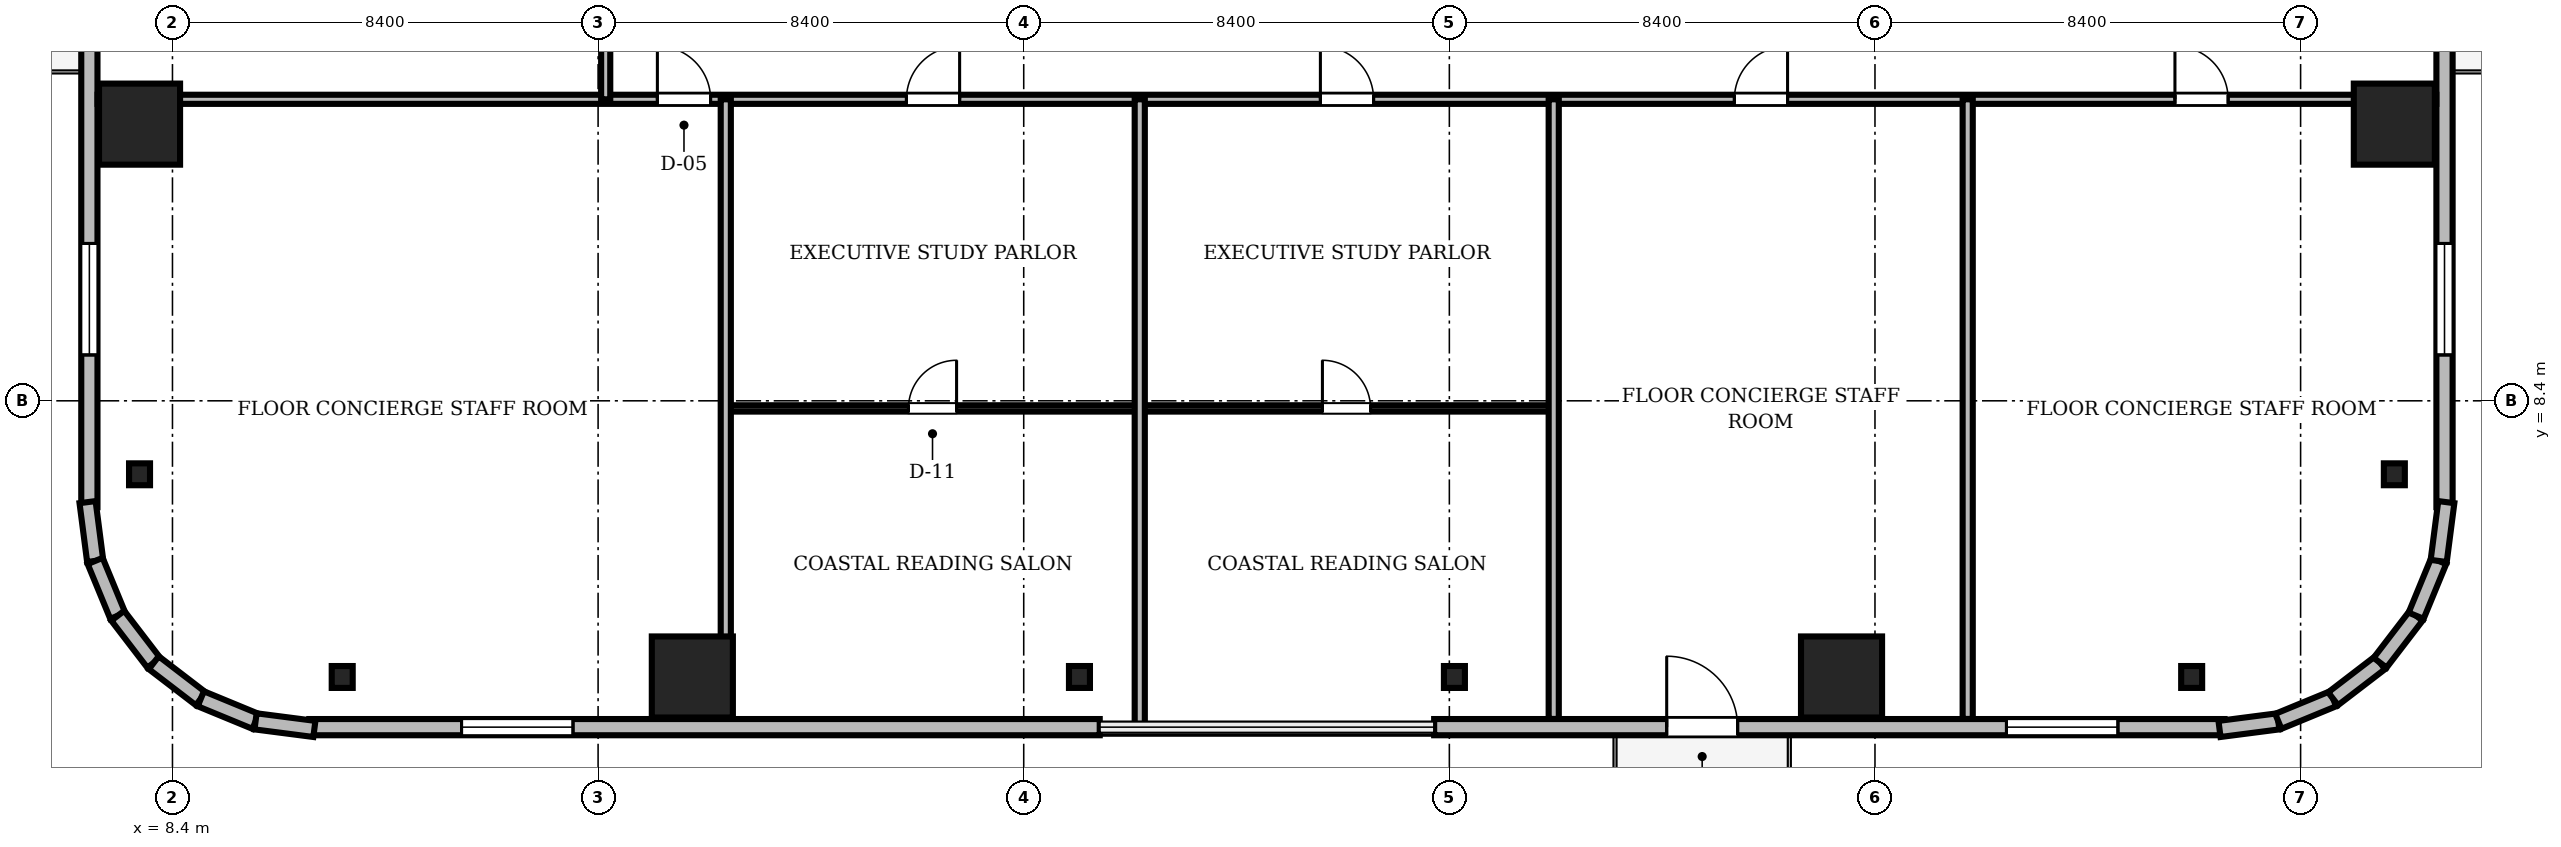
"""IFC4 building model, lengths in metres.
Left out: names, types, materials, properties, quantities, classifications, styles, units other than length and angle.
Written with IfcOpenShell. Run it as: python <this file> out.ifc"""

import sys

from ifc_helpers import new_model, si_unit, direction, frame, frame_2d, origin, origin_2d, place, context, subcontext, project, spatial, rectangle, i_section, extrude, source, transform, mapped, element, fill, save


model = new_model("IFC4")
c1 = context("Model", 3, precision=1e-05, world=origin(), true_north=direction((0.0, 1.0)))
c2 = subcontext(c1, "Body", "Model", "MODEL_VIEW")
j1 = project(units=[si_unit("LENGTHUNIT", "METRE"), si_unit("PLANEANGLEUNIT", "RADIAN")], contexts=[c1])
p1 = place(None, origin())
s1 = spatial("IfcSite", under=j1, at=p1, CompositionType="ELEMENT")
p2 = place(p1, origin())
s2 = spatial("IfcBuilding", under=s1, at=p2, CompositionType="ELEMENT")
p3 = place(p2, frame((0.0, 0.0, 159.4)))
s3 = spatial("IfcBuildingStorey", under=s2, at=p3, CompositionType="ELEMENT", Elevation=159.4)
m1 = source(origin(), c2, "Body", "SweptSolid", [
    extrude(rectangle(XDim=1.6, YDim=1.6, at=origin_2d()), origin(), (0.0, 0.0, 1.0), 3.46),
])
for number, where, z_axis, x_axis in (
    (1, (18.66, 2.95, 0.0), (0.0, 0.0, 1.0), (1.0, 0.0, 0.0)),
    (2, (41.34, 2.95, 0.0), (0.0, 0.0, 1.0), (1.0, 0.0, 0.0)),
    (3, (52.25, 13.86, 0.0), (0.0, 0.0, 1.0), (1.0, 0.0, 0.0)),
    (4, (7.75, 13.86, 0.0), (0.0, 0.0, 1.0), (1.0, 0.0, 0.0)),
):
    element("IfcColumn", number, at=place(p3, frame(where, z_axis=z_axis, x_axis=x_axis)), inside=s3, PredefinedType="COLUMN", context=c2, shape_type="MappedRepresentation", body=[
        mapped(m1, transform((0.0, 0.0, 0.0), scale=1.0)),
    ])
m2 = source(origin(), c2, "Body", "SweptSolid", [
    extrude(i_section(OverallWidth=0.414, OverallDepth=0.432, WebThickness=0.026, FlangeThickness=0.04, FilletRadius=0.015, at=origin_2d()), origin(), (0.0, 0.0, 1.0), 3.46),
])
for number, where, z_axis, x_axis in (
    (5, (11.75, 2.95, 0.0), (0.0, 0.0, 1.0), (1.0, 0.0, 0.0)),
    (6, (26.3, 2.95, 0.0), (0.0, 0.0, 1.0), (1.0, 0.0, 0.0)),
    (7, (33.7, 2.95, 0.0), (0.0, 0.0, 1.0), (1.0, 0.0, 0.0)),
    (8, (48.25, 2.95, 0.0), (0.0, 0.0, 1.0), (1.0, 0.0, 0.0)),
    (9, (52.25, 6.95, 0.0), (0.0, 0.0, 1.0), (1.0, 0.0, 0.0)),
    (10, (7.75, 6.95, 0.0), (0.0, 0.0, 1.0), (1.0, 0.0, 0.0)),
):
    element("IfcColumn", number, at=place(p3, frame(where, z_axis=z_axis, x_axis=x_axis)), inside=s3, PredefinedType="COLUMN", context=c2, shape_type="MappedRepresentation", body=[
        mapped(m2, transform((0.0, 0.0, 0.0), scale=1.0)),
    ])
m3 = source(origin(), c2, "Body", "SweptSolid", [
    extrude(rectangle(XDim=15.6, YDim=0.32, at=frame_2d((7.8, 0.0))), origin(), (0.0, 0.0, 1.0), 3.46),
])
p4 = place(p3, frame((11.1, 1.96, 0.0), z_axis=(0.0, 0.0, 1.0), x_axis=(1.0, 0.0, 0.0)))
e11 = element("IfcWall", 11, at=p4, inside=s3, PredefinedType="SOLIDWALL", context=c2, shape_type="MappedRepresentation", body=[
    mapped(m3, transform((0.0, 0.0, 0.0), scale=1.0)),
])
m4 = source(origin(), c2, "Body", "SweptSolid", [
    extrude(rectangle(XDim=2.2, YDim=2.4, at=frame_2d((1.1, 1.2))), frame((0.0, 0.17, 0.0), z_axis=(0.0, -1.0, 0.0), x_axis=(1.0, 0.0, 0.0)), (0.0, 0.0, 1.0), 0.34),
])
p5 = place(p4, frame((3.005, 0.0, 0.72)))
e12 = element("IfcOpeningElement", 12, at=p5, cuts=e11, PredefinedType="OPENING", context=c2, shape_type="MappedRepresentation", body=[
    mapped(m4, transform((0.0, 0.0, 0.0), scale=1.0)),
])
p6 = place(p3, frame((33.3, 1.96, 0.0), z_axis=(0.0, 0.0, 1.0), x_axis=(1.0, 0.0, 0.0)))
e13 = element("IfcWall", 13, at=p6, inside=s3, PredefinedType="SOLIDWALL", context=c2, shape_type="MappedRepresentation", body=[
    mapped(m3, transform((0.0, 0.0, 0.0), scale=1.0)),
])
m5 = source(origin(), c2, "Body", "SweptSolid", [
    extrude(rectangle(XDim=1.4, YDim=2.3, at=frame_2d((0.7, 1.15))), frame((0.0, 0.17, 0.0), z_axis=(0.0, -1.0, 0.0), x_axis=(1.0, 0.0, 0.0)), (0.0, 0.0, 1.0), 0.34),
])
p7 = place(p6, frame((4.59, 0.0, 0.0)))
e14 = element("IfcOpeningElement", 14, at=p7, cuts=e13, PredefinedType="OPENING", context=c2, shape_type="MappedRepresentation", body=[
    mapped(m5, transform((0.0, 0.0, 0.0), scale=1.0)),
])
p8 = place(p6, frame((11.295, 0.0, 0.72)))
e15 = element("IfcOpeningElement", 15, at=p8, cuts=e13, PredefinedType="OPENING", context=c2, shape_type="MappedRepresentation", body=[
    mapped(m4, transform((0.0, 0.0, 0.0), scale=1.0)),
])
p9 = place(p3, frame((6.76, 21.9, 0.0), z_axis=(0.0, 0.0, 1.0), x_axis=(0.0, -1.0, 0.0)))
e16 = element("IfcWall", 16, at=p9, inside=s3, PredefinedType="SOLIDWALL", context=c2, shape_type="MappedRepresentation", body=[
    mapped(m3, transform((0.0, 0.0, 0.0), scale=1.0)),
])
p10 = place(p9, frame((4.59, 0.0, 0.0)))
e17 = element("IfcOpeningElement", 17, at=p10, cuts=e16, PredefinedType="OPENING", context=c2, shape_type="MappedRepresentation", body=[
    mapped(m5, transform((0.0, 0.0, 0.0), scale=1.0)),
])
p11 = place(p9, frame((10.395, 0.0, 0.72)))
e18 = element("IfcOpeningElement", 18, at=p11, cuts=e16, PredefinedType="OPENING", context=c2, shape_type="MappedRepresentation", body=[
    mapped(m4, transform((0.0, 0.0, 0.0), scale=1.0)),
])
p12 = place(p3, frame((53.24, 6.3, 0.0), z_axis=(0.0, 0.0, 1.0), x_axis=(0.0, 1.0, 0.0)))
e19 = element("IfcWall", 19, at=p12, inside=s3, PredefinedType="SOLIDWALL", context=c2, shape_type="MappedRepresentation", body=[
    mapped(m3, transform((0.0, 0.0, 0.0), scale=1.0)),
])
p13 = place(p12, frame((9.61, 0.0, 0.0)))
e20 = element("IfcOpeningElement", 20, at=p13, cuts=e19, PredefinedType="OPENING", context=c2, shape_type="MappedRepresentation", body=[
    mapped(m5, transform((0.0, 0.0, 0.0), scale=1.0)),
])
p14 = place(p12, frame((3.005, 0.0, 0.72)))
e21 = element("IfcOpeningElement", 21, at=p14, cuts=e19, PredefinedType="OPENING", context=c2, shape_type="MappedRepresentation", body=[
    mapped(m4, transform((0.0, 0.0, 0.0), scale=1.0)),
])
m6 = source(origin(), c2, "Body", "SweptSolid", [
    extrude(rectangle(XDim=1.171, YDim=0.32, at=frame_2d((0.585, 0.0))), origin(), (0.0, 0.0, 1.0), 3.46),
])
p15 = place(p3, frame((6.724, 6.401, 0.0), z_axis=(0.0, 0.0, 1.0), x_axis=(0.128269133229, -0.991739395941, 0.0)))
e22 = element("IfcWall", 22, at=p15, inside=s3, PredefinedType="SOLIDWALL", context=c2, shape_type="MappedRepresentation", body=[
    mapped(m6, transform((0.0, 0.0, 0.0), scale=1.0)),
])
m7 = source(origin(), c2, "Body", "SweptSolid", [
    extrude(rectangle(XDim=1.169, YDim=0.32, at=frame_2d((0.584, 0.0))), origin(), (0.0, 0.0, 1.0), 3.46),
])
for number, where, z_axis, x_axis in (
    (23, (6.875, 5.24, 0.0), (0.0, 0.0, 1.0), (0.381, -0.925, 0.0)),
    (24, (7.32, 4.159, 0.0), (0.0, 0.0, 1.0), (0.608, -0.794, 0.0)),
):
    element("IfcWall", number, at=place(p3, frame(where, z_axis=z_axis, x_axis=x_axis)), inside=s3, PredefinedType="SOLIDWALL", context=c2, shape_type="MappedRepresentation", body=[
        mapped(m7, transform((0.0, 0.0, 0.0), scale=1.0)),
    ])
m8 = source(origin(), c2, "Body", "SweptSolid", [
    extrude(rectangle(XDim=1.169, YDim=0.32, at=frame_2d((0.584, 0.0))), origin(), (0.0, 0.0, 1.0), 3.46),
])
p16 = place(p3, frame((8.031, 3.231, 0.0), z_axis=(0.0, 0.0, 1.0), x_axis=(0.793663520347, -0.608356981114, 0.0)))
e25 = element("IfcWall", 25, at=p16, inside=s3, PredefinedType="SOLIDWALL", context=c2, shape_type="MappedRepresentation", body=[
    mapped(m8, transform((0.0, 0.0, 0.0), scale=1.0)),
])
m9 = source(origin(), c2, "Body", "SweptSolid", [
    extrude(rectangle(XDim=1.169, YDim=0.32, at=frame_2d((0.585, 0.0))), origin(), (0.0, 0.0, 1.0), 3.46),
])
p17 = place(p3, frame((8.959, 2.52, 0.0), z_axis=(0.0, 0.0, 1.0), x_axis=(0.924479075121, -0.381232789334, 0.0)))
e26 = element("IfcWall", 26, at=p17, inside=s3, PredefinedType="SOLIDWALL", context=c2, shape_type="MappedRepresentation", body=[
    mapped(m9, transform((0.0, 0.0, 0.0), scale=1.0)),
])
m10 = source(origin(), c2, "Body", "SweptSolid", [
    extrude(rectangle(XDim=1.17, YDim=0.32, at=frame_2d((0.585, 0.0))), origin(), (0.0, 0.0, 1.0), 3.46),
])
for number, where, z_axis, x_axis in (
    (27, (10.04, 2.074, 0.0), (0.0, 0.0, 1.0), (0.992, -0.128, 0.0)),
    (28, (48.8, 1.925, 0.0), (0.0, 0.0, 1.0), (0.992, 0.128, 0.0)),
):
    element("IfcWall", number, at=place(p3, frame(where, z_axis=z_axis, x_axis=x_axis)), inside=s3, PredefinedType="SOLIDWALL", context=c2, shape_type="MappedRepresentation", body=[
        mapped(m10, transform((0.0, 0.0, 0.0), scale=1.0)),
    ])
p18 = place(p3, frame((49.96, 2.074, 0.0), z_axis=(0.0, 0.0, 1.0), x_axis=(0.924479075121, 0.381232789334, 0.0)))
e29 = element("IfcWall", 29, at=p18, inside=s3, PredefinedType="SOLIDWALL", context=c2, shape_type="MappedRepresentation", body=[
    mapped(m9, transform((0.0, 0.0, 0.0), scale=1.0)),
])
p19 = place(p3, frame((51.041, 2.52, 0.0), z_axis=(0.0, 0.0, 1.0), x_axis=(0.793663520347, 0.608356981114, 0.0)))
e30 = element("IfcWall", 30, at=p19, inside=s3, PredefinedType="SOLIDWALL", context=c2, shape_type="MappedRepresentation", body=[
    mapped(m8, transform((0.0, 0.0, 0.0), scale=1.0)),
])
for number, where, z_axis, x_axis in (
    (31, (51.969, 3.231, 0.0), (0.0, 0.0, 1.0), (0.608, 0.794, 0.0)),
    (32, (52.68, 4.159, 0.0), (0.0, 0.0, 1.0), (0.381, 0.925, 0.0)),
):
    element("IfcWall", number, at=place(p3, frame(where, z_axis=z_axis, x_axis=x_axis)), inside=s3, PredefinedType="SOLIDWALL", context=c2, shape_type="MappedRepresentation", body=[
        mapped(m7, transform((0.0, 0.0, 0.0), scale=1.0)),
    ])
p20 = place(p3, frame((53.125, 5.24, 0.0), z_axis=(0.0, 0.0, 1.0), x_axis=(0.128269133229, 0.991739395941, 0.0)))
e33 = element("IfcWall", 33, at=p20, inside=s3, PredefinedType="SOLIDWALL", context=c2, shape_type="MappedRepresentation", body=[
    mapped(m6, transform((0.0, 0.0, 0.0), scale=1.0)),
])
m11 = source(origin(), c2, "Body", "SweptSolid", [
    extrude(rectangle(XDim=46.156, YDim=0.18, at=frame_2d((23.078, 0.0))), origin(), (0.0, 0.0, 1.0), 2.702),
])
p21 = place(p3, frame((6.922, 14.35, 0.0), z_axis=(0.0, 0.0, 1.0), x_axis=(1.0, 0.0, 0.0)))
e34 = element("IfcWall", 34, at=p21, inside=s3, PredefinedType="PARTITIONING", context=c2, shape_type="MappedRepresentation", body=[
    mapped(m11, transform((0.0, 0.0, 0.0), scale=1.0)),
])
m12 = source(origin(), c2, "Body", "SweptSolid", [
    extrude(rectangle(XDim=1.05, YDim=2.2, at=frame_2d((0.525, 1.1))), frame((0.0, 0.1, 0.0), z_axis=(0.0, -1.0, 0.0), x_axis=(1.0, 0.0, 0.0)), (0.0, 0.0, 1.0), 0.2),
])
p22 = place(p21, frame((11.048, 0.0, 0.0)))
e35 = element("IfcOpeningElement", 35, at=p22, cuts=e34, PredefinedType="OPENING", context=c2, shape_type="MappedRepresentation", body=[
    mapped(m12, transform((0.0, 0.0, 0.0), scale=1.0)),
])
p23 = place(p21, frame((15.963, 0.0, 0.0)))
e36 = element("IfcOpeningElement", 36, at=p23, cuts=e34, PredefinedType="OPENING", context=c2, shape_type="MappedRepresentation", body=[
    mapped(m12, transform((0.0, 0.0, 0.0), scale=1.0)),
])
p24 = place(p21, frame((24.133, 0.0, 0.0)))
e37 = element("IfcOpeningElement", 37, at=p24, cuts=e34, PredefinedType="OPENING", context=c2, shape_type="MappedRepresentation", body=[
    mapped(m12, transform((0.0, 0.0, 0.0), scale=1.0)),
])
p25 = place(p21, frame((32.303, 0.0, 0.0)))
e38 = element("IfcOpeningElement", 38, at=p25, cuts=e34, PredefinedType="OPENING", context=c2, shape_type="MappedRepresentation", body=[
    mapped(m12, transform((0.0, 0.0, 0.0), scale=1.0)),
])
p26 = place(p21, frame((40.998, 0.0, 0.0)))
e39 = element("IfcOpeningElement", 39, at=p26, cuts=e34, PredefinedType="OPENING", context=c2, shape_type="MappedRepresentation", body=[
    mapped(m12, transform((0.0, 0.0, 0.0), scale=1.0)),
])
m13 = source(origin(), c2, "Body", "SweptSolid", [
    extrude(rectangle(XDim=8.17, YDim=0.125, at=frame_2d((4.085, 0.0))), origin(), (0.0, 0.0, 1.0), 2.852),
])
p27 = place(p3, frame((19.32, 8.25, 0.0), z_axis=(0.0, 0.0, 1.0), x_axis=(1.0, 0.0, 0.0)))
e40 = element("IfcWall", 40, at=p27, inside=s3, PredefinedType="PARTITIONING", context=c2, shape_type="MappedRepresentation", body=[
    mapped(m13, transform((0.0, 0.0, 0.0), scale=1.0)),
])
m14 = source(origin(), c2, "Body", "SweptSolid", [
    extrude(rectangle(XDim=0.95, YDim=2.15, at=frame_2d((0.475, 1.075))), frame((0.0, 0.073, 0.0), z_axis=(0.0, -1.0, 0.0), x_axis=(1.0, 0.0, 0.0)), (0.0, 0.0, 1.0), 0.145),
])
p28 = place(p27, frame((3.605, 0.0, 0.0)))
e41 = element("IfcOpeningElement", 41, at=p28, cuts=e40, PredefinedType="OPENING", context=c2, shape_type="MappedRepresentation", body=[
    mapped(m14, transform((0.0, 0.0, 0.0), scale=1.0)),
])
p29 = place(p3, frame((27.49, 8.25, 0.0), z_axis=(0.0, 0.0, 1.0), x_axis=(1.0, 0.0, 0.0)))
e42 = element("IfcWall", 42, at=p29, inside=s3, PredefinedType="PARTITIONING", context=c2, shape_type="MappedRepresentation", body=[
    mapped(m13, transform((0.0, 0.0, 0.0), scale=1.0)),
])
p30 = place(p29, frame((3.605, 0.0, 0.0)))
e43 = element("IfcOpeningElement", 43, at=p30, cuts=e42, PredefinedType="OPENING", context=c2, shape_type="MappedRepresentation", body=[
    mapped(m14, transform((0.0, 0.0, 0.0), scale=1.0)),
])
m15 = source(origin(), c2, "Body", "SweptSolid", [
    extrude(rectangle(XDim=14.2, YDim=0.18, at=frame_2d((7.1, 0.0))), origin(), (0.0, 0.0, 1.0), 2.852),
])
p31 = place(p3, frame((16.95, 14.35, 0.0), z_axis=(0.0, 0.0, 1.0), x_axis=(0.0, 1.0, 0.0)))
e44 = element("IfcWall", 44, at=p31, inside=s3, PredefinedType="PARTITIONING", context=c2, shape_type="MappedRepresentation", body=[
    mapped(m15, transform((0.0, 0.0, 0.0), scale=1.0)),
])
m16 = source(origin(), c2, "Body", "SweptSolid", [
    extrude(rectangle(XDim=12.228, YDim=0.2, at=frame_2d((6.114, 0.0))), origin(), (0.0, 0.0, 1.0), 2.702),
])
p32 = place(p3, frame((19.32, 2.122, 0.0), z_axis=(0.0, 0.0, 1.0), x_axis=(0.0, 1.0, 0.0)))
e45 = element("IfcWall", 45, at=p32, inside=s3, PredefinedType="PARTITIONING", context=c2, shape_type="MappedRepresentation", body=[
    mapped(m16, transform((0.0, 0.0, 0.0), scale=1.0)),
])
m17 = source(origin(), c2, "Body", "SweptSolid", [
    extrude(rectangle(XDim=12.42, YDim=0.2, at=frame_2d((6.21, 0.0))), origin(), (0.0, 0.0, 1.0), 2.702),
])
p33 = place(p3, frame((27.49, 1.93, 0.0), z_axis=(0.0, 0.0, 1.0), x_axis=(0.0, 1.0, 0.0)))
e46 = element("IfcWall", 46, at=p33, inside=s3, PredefinedType="PARTITIONING", context=c2, shape_type="MappedRepresentation", body=[
    mapped(m17, transform((0.0, 0.0, 0.0), scale=1.0)),
])
for number, where, z_axis, x_axis in (
    (47, (35.66, 2.122, 0.0), (0.0, 0.0, 1.0), (0.0, 1.0, 0.0)),
    (48, (43.83, 2.122, 0.0), (0.0, 0.0, 1.0), (0.0, 1.0, 0.0)),
):
    element("IfcWall", number, at=place(p3, frame(where, z_axis=z_axis, x_axis=x_axis)), inside=s3, PredefinedType="PARTITIONING", context=c2, shape_type="MappedRepresentation", body=[
        mapped(m16, transform((0.0, 0.0, 0.0), scale=1.0)),
    ])
m18 = source(origin(), c2, "Body", "SweptSolid", [
    extrude(rectangle(XDim=1.4, YDim=2.3, at=frame_2d((0.7, 1.15))), frame((0.0, 0.025, 0.0), z_axis=(0.0, -1.0, 0.0), x_axis=(1.0, 0.0, 0.0)), (0.0, 0.0, 1.0), 0.05),
])
p34 = place(p7, frame((1.4, 0.0, 0.0), z_axis=(0.0, 0.0, 1.0), x_axis=(-1.0, 0.0, 0.0)))
e49 = element("IfcDoor", 49, at=p34, inside=s3, OperationType="DOUBLE_DOOR_SLIDING", PredefinedType="DOOR", context=c2, shape_type="MappedRepresentation", body=[
    mapped(m18, transform((0.0, 0.0, 0.0), scale=1.0)),
])
fill(e14, e49)
m19 = source(origin(), c2, "Body", "SweptSolid", [
    extrude(rectangle(XDim=2.2, YDim=2.4, at=frame_2d((1.1, 1.2))), frame((0.0, 0.03, 0.0), z_axis=(0.0, -1.0, 0.0), x_axis=(1.0, 0.0, 0.0)), (0.0, 0.0, 1.0), 0.06),
])
p35 = place(p5, origin())
e50 = element("IfcWindow", 50, at=p35, inside=s3, PartitioningType="SINGLE_PANEL", PredefinedType="WINDOW", context=c2, shape_type="MappedRepresentation", body=[
    mapped(m19, transform((0.0, 0.0, 0.0), scale=1.0)),
])
fill(e12, e50)
p36 = place(p8, origin())
e51 = element("IfcWindow", 51, at=p36, inside=s3, PartitioningType="SINGLE_PANEL", PredefinedType="WINDOW", context=c2, shape_type="MappedRepresentation", body=[
    mapped(m19, transform((0.0, 0.0, 0.0), scale=1.0)),
])
fill(e15, e51)
p37 = place(p11, origin())
e52 = element("IfcWindow", 52, at=p37, inside=s3, PartitioningType="SINGLE_PANEL", PredefinedType="WINDOW", context=c2, shape_type="MappedRepresentation", body=[
    mapped(m19, transform((0.0, 0.0, 0.0), scale=1.0)),
])
fill(e18, e52)
p38 = place(p14, origin())
e53 = element("IfcWindow", 53, at=p38, inside=s3, PartitioningType="SINGLE_PANEL", PredefinedType="WINDOW", context=c2, shape_type="MappedRepresentation", body=[
    mapped(m19, transform((0.0, 0.0, 0.0), scale=1.0)),
])
fill(e21, e53)
m20 = source(origin(), c2, "Body", "SweptSolid", [
    extrude(rectangle(XDim=1.05, YDim=2.2, at=frame_2d((0.525, 1.1))), frame((0.0, 0.025, 0.0), z_axis=(0.0, -1.0, 0.0), x_axis=(1.0, 0.0, 0.0)), (0.0, 0.0, 1.0), 0.05),
])
p39 = place(p22, origin())
e54 = element("IfcDoor", 54, at=p39, inside=s3, OperationType="SINGLE_SWING_LEFT", PredefinedType="DOOR", context=c2, shape_type="MappedRepresentation", body=[
    mapped(m20, transform((0.0, 0.0, 0.0), scale=1.0)),
])
fill(e35, e54)
p40 = place(p23, origin())
e55 = element("IfcDoor", 55, at=p40, inside=s3, OperationType="SINGLE_SWING_RIGHT", PredefinedType="DOOR", context=c2, shape_type="MappedRepresentation", body=[
    mapped(m20, transform((0.0, 0.0, 0.0), scale=1.0)),
])
fill(e36, e55)
p41 = place(p24, origin())
e56 = element("IfcDoor", 56, at=p41, inside=s3, OperationType="SINGLE_SWING_LEFT", PredefinedType="DOOR", context=c2, shape_type="MappedRepresentation", body=[
    mapped(m20, transform((0.0, 0.0, 0.0), scale=1.0)),
])
fill(e37, e56)
p42 = place(p25, origin())
e57 = element("IfcDoor", 57, at=p42, inside=s3, OperationType="SINGLE_SWING_RIGHT", PredefinedType="DOOR", context=c2, shape_type="MappedRepresentation", body=[
    mapped(m20, transform((0.0, 0.0, 0.0), scale=1.0)),
])
fill(e38, e57)
p43 = place(p26, origin())
e58 = element("IfcDoor", 58, at=p43, inside=s3, OperationType="SINGLE_SWING_LEFT", PredefinedType="DOOR", context=c2, shape_type="MappedRepresentation", body=[
    mapped(m20, transform((0.0, 0.0, 0.0), scale=1.0)),
])
fill(e39, e58)
m21 = source(origin(), c2, "Body", "SweptSolid", [
    extrude(rectangle(XDim=0.95, YDim=2.15, at=frame_2d((0.475, 1.075))), frame((0.0, 0.025, 0.0), z_axis=(0.0, -1.0, 0.0), x_axis=(1.0, 0.0, 0.0)), (0.0, 0.0, 1.0), 0.05),
])
p44 = place(p28, origin())
e59 = element("IfcDoor", 59, at=p44, inside=s3, OperationType="SINGLE_SWING_RIGHT", PredefinedType="DOOR", context=c2, shape_type="MappedRepresentation", body=[
    mapped(m21, transform((0.0, 0.0, 0.0), scale=1.0)),
])
fill(e41, e59)
p45 = place(p30, origin())
e60 = element("IfcDoor", 60, at=p45, inside=s3, OperationType="SINGLE_SWING_LEFT", PredefinedType="DOOR", context=c2, shape_type="MappedRepresentation", body=[
    mapped(m21, transform((0.0, 0.0, 0.0), scale=1.0)),
])
fill(e43, e60)
save(model, sys.argv[1])
